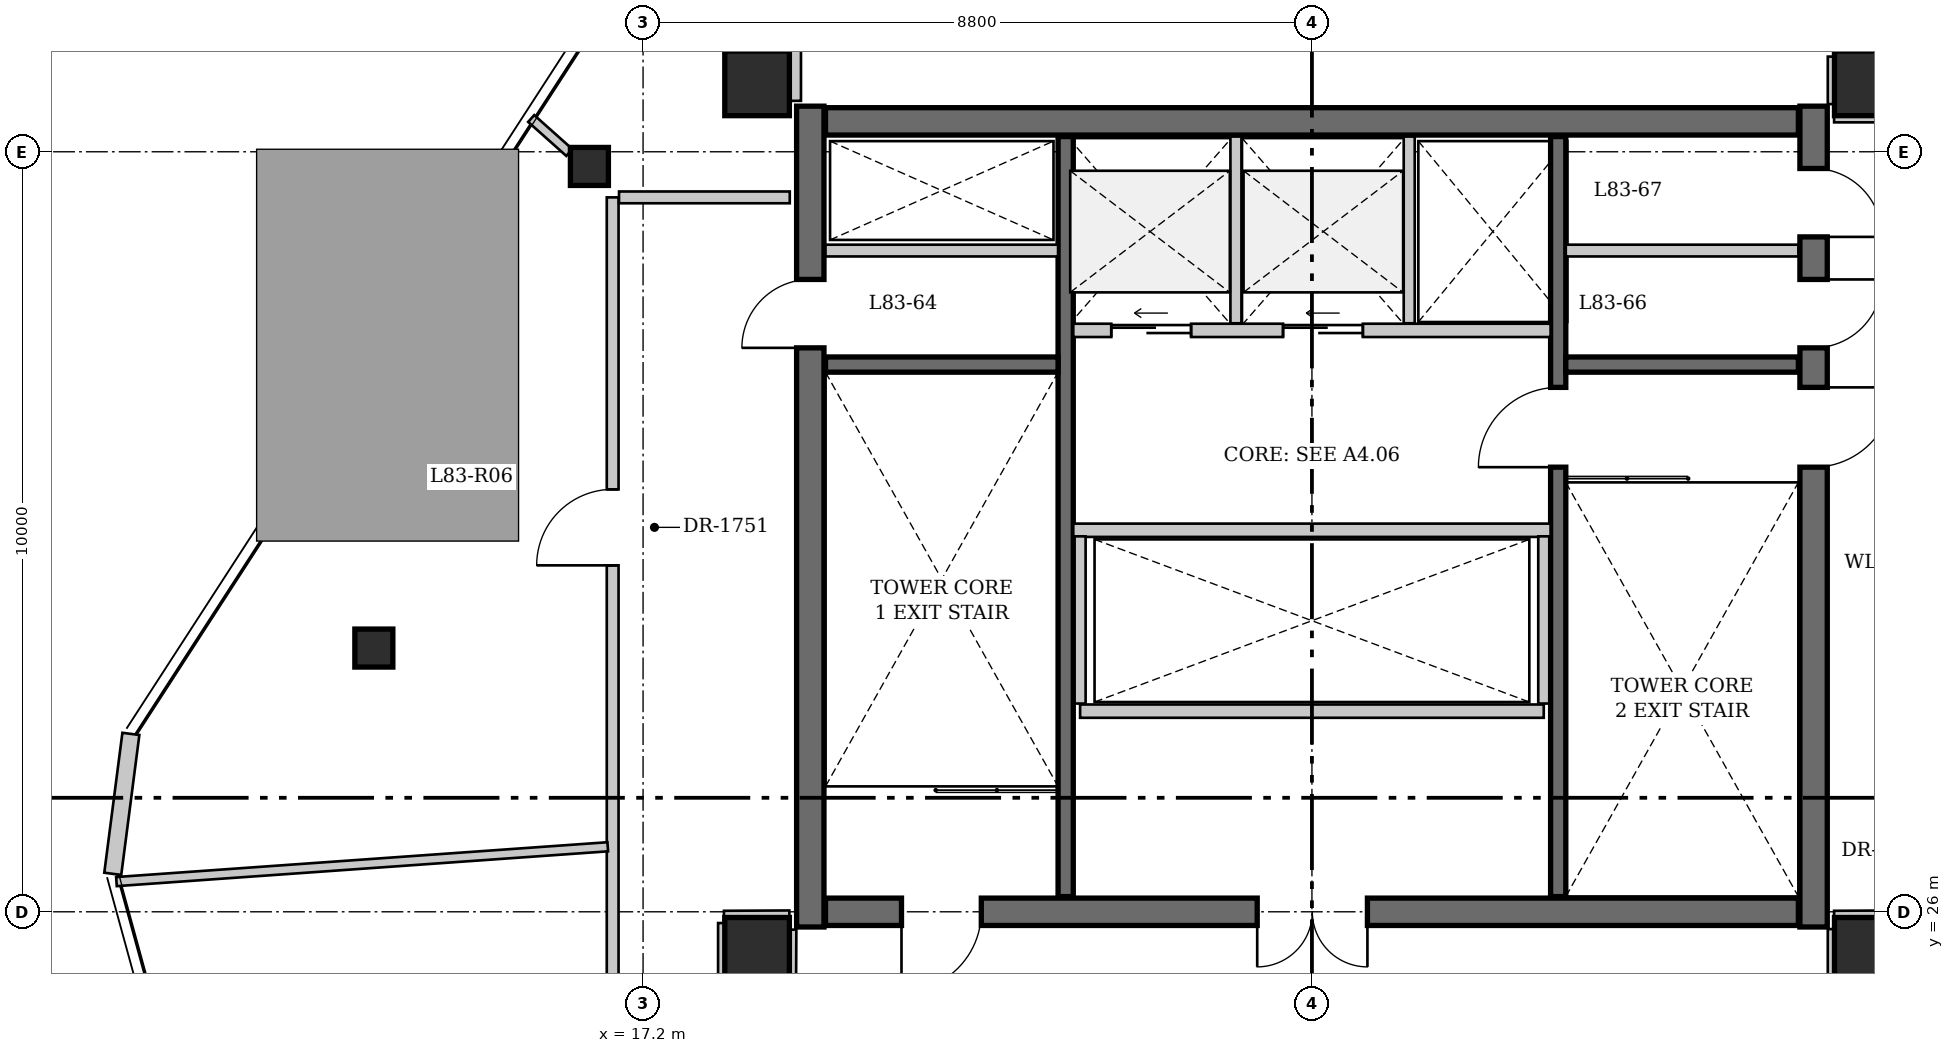
"""IFC4 building model, lengths in metres.
Left out: names, types, materials, properties, quantities, classifications, styles, units other than length and angle.
Written with IfcOpenShell. Run it as: python <this file> out.ifc"""

import sys

from ifc_helpers import new_model, si_unit, direction, frame, frame_2d, origin, origin_2d, place, context, subcontext, project, spatial, rectangle, hollow_rectangle, extrude, source, transform, mapped, element, fill, save


model = new_model("IFC4")
c1 = context("Model", 3, precision=1e-05, world=origin(), true_north=direction((0.0, 1.0)))
c2 = subcontext(c1, "Body", "Model", "MODEL_VIEW")
j1 = project(units=[si_unit("LENGTHUNIT", "METRE"), si_unit("PLANEANGLEUNIT", "RADIAN")], contexts=[c1])
p1 = place(None, origin())
s1 = spatial("IfcSite", under=j1, at=p1, CompositionType="ELEMENT")
p2 = place(p1, origin())
s2 = spatial("IfcBuilding", under=s1, at=p2, CompositionType="ELEMENT")
p3 = place(p2, frame((0.0, 0.0, 312.0)))
s3 = spatial("IfcBuildingStorey", under=s2, at=p3, CompositionType="ELEMENT", Elevation=312.0)
for number, where, z_axis, x_axis in (
    (1, (13.658, 29.47, 0.0), (0.0, 0.0, 1.0), (1.0, 0.0, 0.0)),
    (2, (16.494, 35.807, 0.0), (0.0, 0.0, 1.0), (1.0, 0.0, 0.0)),
):
    element("IfcColumn", number, at=place(p3, frame(where, z_axis=z_axis, x_axis=x_axis)), inside=s3, PredefinedType="COLUMN", context=c2, shape_type="SweptSolid", body=[
        extrude(hollow_rectangle(XDim=0.5, YDim=0.5, WallThickness=0.025, at=origin_2d()), origin(), (0.0, 0.0, 1.0), 3.725),
    ])
for number, where, z_axis, x_axis in (
    (3, (18.7, 25.5, 0.0), (0.0, 0.0, 1.0), (1.0, 0.0, 0.0)),
    (4, (33.3, 25.5, 0.0), (0.0, 0.0, 1.0), (1.0, 0.0, 0.0)),
    (5, (33.3, 36.9, 0.0), (0.0, 0.0, 1.0), (1.0, 0.0, 0.0)),
    (6, (18.7, 36.9, 0.0), (0.0, 0.0, 1.0), (1.0, 0.0, 0.0)),
):
    element("IfcColumn", number, at=place(p3, frame(where, z_axis=z_axis, x_axis=x_axis)), inside=s3, PredefinedType="COLUMN", context=c2, shape_type="SweptSolid", body=[
        extrude(rectangle(XDim=0.85, YDim=0.85, at=origin_2d()), origin(), (0.0, 0.0, 1.0), 3.725),
    ])
p4 = place(p3, frame((10.223, 26.5, 0.0), z_axis=(0.0, 0.0, 1.0), x_axis=(0.128338490171, 0.991730423019, 0.0)))
e7 = element("IfcWall", 7, at=p4, inside=s3, PredefinedType="SOLIDWALL", context=c2, shape_type="SweptSolid", body=[
    extrude(rectangle(XDim=1.857, YDim=0.225, at=frame_2d((0.928, 0.0))), origin(), (0.0, 0.0, 1.0), 3.74),
])
p5 = place(p3, frame((19.4, 25.8, 0.0), z_axis=(0.0, 0.0, 1.0), x_axis=(0.0, 1.0, 0.0)))
e8 = element("IfcWall", 8, at=p5, inside=s3, PredefinedType="SHEAR", context=c2, shape_type="SweptSolid", body=[
    extrude(rectangle(XDim=10.8, YDim=0.36, at=frame_2d((5.4, 0.0))), origin(), (0.0, 0.0, 1.0), 4.0),
])
p6 = place(p5, frame((7.62, 0.0, 0.0)))
e9 = element("IfcOpeningElement", 9, at=p6, cuts=e8, PredefinedType="OPENING", context=c2, shape_type="SweptSolid", body=[
    extrude(rectangle(XDim=0.9, YDim=2.1, at=frame_2d((0.45, 1.05))), frame((0.0, 0.19, 0.0), z_axis=(0.0, -1.0, 0.0), x_axis=(1.0, 0.0, 0.0)), (0.0, 0.0, 1.0), 0.38),
])
p7 = place(p3, frame((32.6, 36.6, 0.0), z_axis=(0.0, 0.0, 1.0), x_axis=(0.0, -1.0, 0.0)))
e10 = element("IfcWall", 10, at=p7, inside=s3, PredefinedType="SHEAR", context=c2, shape_type="SweptSolid", body=[
    extrude(rectangle(XDim=10.8, YDim=0.36, at=frame_2d((5.4, 0.0))), origin(), (0.0, 0.0, 1.0), 4.0),
])
p8 = place(p7, frame((3.7, 0.0, 0.0)))
e11 = element("IfcOpeningElement", 11, at=p8, cuts=e10, PredefinedType="OPENING", context=c2, shape_type="SweptSolid", body=[
    extrude(rectangle(XDim=1.05, YDim=2.15, at=frame_2d((0.525, 1.075))), frame((0.0, 0.19, 0.0), z_axis=(0.0, -1.0, 0.0), x_axis=(1.0, 0.0, 0.0)), (0.0, 0.0, 1.0), 0.38),
])
p9 = place(p7, frame((2.28, 0.0, 0.0)))
e12 = element("IfcOpeningElement", 12, at=p9, cuts=e10, PredefinedType="OPENING", context=c2, shape_type="SweptSolid", body=[
    extrude(rectangle(XDim=0.9, YDim=2.1, at=frame_2d((0.45, 1.05))), frame((0.0, 0.19, 0.0), z_axis=(0.0, -1.0, 0.0), x_axis=(1.0, 0.0, 0.0)), (0.0, 0.0, 1.0), 0.38),
])
p10 = place(p7, frame((0.82, 0.0, 0.0)))
e13 = element("IfcOpeningElement", 13, at=p10, cuts=e10, PredefinedType="OPENING", context=c2, shape_type="SweptSolid", body=[
    extrude(rectangle(XDim=0.9, YDim=2.1, at=frame_2d((0.45, 1.05))), frame((0.0, 0.19, 0.0), z_axis=(0.0, -1.0, 0.0), x_axis=(1.0, 0.0, 0.0)), (0.0, 0.0, 1.0), 0.38),
])
p11 = place(p3, frame((19.6, 36.4, 0.0), z_axis=(0.0, 0.0, 1.0), x_axis=(1.0, 0.0, 0.0)))
e14 = element("IfcWall", 14, at=p11, inside=s3, PredefinedType="SHEAR", context=c2, shape_type="SweptSolid", body=[
    extrude(rectangle(XDim=12.8, YDim=0.36, at=frame_2d((6.4, 0.0))), origin(), (0.0, 0.0, 1.0), 4.0),
])
p12 = place(p3, frame((32.4, 26.0, 0.0), z_axis=(0.0, 0.0, 1.0), x_axis=(-1.0, 0.0, 0.0)))
e15 = element("IfcWall", 15, at=p12, inside=s3, PredefinedType="SHEAR", context=c2, shape_type="SweptSolid", body=[
    extrude(rectangle(XDim=12.8, YDim=0.36, at=frame_2d((6.4, 0.0))), origin(), (0.0, 0.0, 1.0), 4.0),
])
p13 = place(p12, frame((10.75, 0.0, 0.0)))
e16 = element("IfcOpeningElement", 16, at=p13, cuts=e15, PredefinedType="OPENING", context=c2, shape_type="SweptSolid", body=[
    extrude(rectangle(XDim=1.05, YDim=2.15, at=frame_2d((0.525, 1.075))), frame((0.0, 0.19, 0.0), z_axis=(0.0, -1.0, 0.0), x_axis=(1.0, 0.0, 0.0)), (0.0, 0.0, 1.0), 0.38),
])
p14 = place(p12, frame((5.67, 0.0, 0.0)))
e17 = element("IfcOpeningElement", 17, at=p14, cuts=e15, PredefinedType="OPENING", context=c2, shape_type="SweptSolid", body=[
    extrude(rectangle(XDim=1.45, YDim=2.2, at=frame_2d((0.725, 1.1))), frame((0.0, 0.19, 0.0), z_axis=(0.0, -1.0, 0.0), x_axis=(1.0, 0.0, 0.0)), (0.0, 0.0, 1.0), 0.38),
])
p15 = place(p3, frame((22.76, 26.2, 0.0), z_axis=(0.0, 0.0, 1.0), x_axis=(0.0, 1.0, 0.0)))
e18 = element("IfcWall", 18, at=p15, inside=s3, PredefinedType="SHEAR", context=c2, shape_type="SweptSolid", body=[
    extrude(rectangle(XDim=10.0, YDim=0.2, at=frame_2d((5.0, 0.0))), origin(), (0.0, 0.0, 1.0), 4.0),
])
p16 = place(p3, frame((29.24, 26.2, 0.0), z_axis=(0.0, 0.0, 1.0), x_axis=(0.0, 1.0, 0.0)))
e19 = element("IfcWall", 19, at=p16, inside=s3, PredefinedType="SHEAR", context=c2, shape_type="SweptSolid", body=[
    extrude(rectangle(XDim=10.0, YDim=0.2, at=frame_2d((5.0, 0.0))), origin(), (0.0, 0.0, 1.0), 4.0),
])
p17 = place(p16, frame((5.65, 0.0, 0.0)))
e20 = element("IfcOpeningElement", 20, at=p17, cuts=e19, PredefinedType="OPENING", context=c2, shape_type="SweptSolid", body=[
    extrude(rectangle(XDim=1.05, YDim=2.15, at=frame_2d((0.525, 1.075))), frame((0.0, 0.11, 0.0), z_axis=(0.0, -1.0, 0.0), x_axis=(1.0, 0.0, 0.0)), (0.0, 0.0, 1.0), 0.22),
])
for number, where, z_axis, x_axis in (
    (21, (19.6, 33.2, 0.0), (0.0, 0.0, 1.0), (1.0, 0.0, 0.0)),
    (22, (29.34, 33.2, 0.0), (0.0, 0.0, 1.0), (1.0, 0.0, 0.0)),
):
    element("IfcWall", number, at=place(p3, frame(where, z_axis=z_axis, x_axis=x_axis)), inside=s3, PredefinedType="SHEAR", context=c2, shape_type="SweptSolid", body=[
        extrude(rectangle(XDim=3.06, YDim=0.2, at=frame_2d((1.53, 0.0))), origin(), (0.0, 0.0, 1.0), 4.0),
    ])
p18 = place(p3, frame((22.86, 33.65, 0.0), z_axis=(0.0, 0.0, 1.0), x_axis=(1.0, 0.0, 0.0)))
e23 = element("IfcWall", 23, at=p18, inside=s3, PredefinedType="SOLIDWALL", context=c2, shape_type="SweptSolid", body=[
    extrude(rectangle(XDim=6.28, YDim=0.175, at=frame_2d((3.14, 0.0))), origin(), (0.0, 0.0, 1.0), 3.725),
])
p19 = place(p18, frame((0.5, 0.0, 0.0)))
e24 = element("IfcOpeningElement", 24, at=p19, cuts=e23, PredefinedType="OPENING", context=c2, shape_type="SweptSolid", body=[
    extrude(rectangle(XDim=1.05, YDim=2.15, at=frame_2d((0.525, 1.075))), frame((0.0, 0.098, 0.0), z_axis=(0.0, -1.0, 0.0), x_axis=(1.0, 0.0, 0.0)), (0.0, 0.0, 1.0), 0.195),
])
p20 = place(p18, frame((2.76, 0.0, 0.0)))
e25 = element("IfcOpeningElement", 25, at=p20, cuts=e23, PredefinedType="OPENING", context=c2, shape_type="SweptSolid", body=[
    extrude(rectangle(XDim=1.05, YDim=2.15, at=frame_2d((0.525, 1.075))), frame((0.0, 0.098, 0.0), z_axis=(0.0, -1.0, 0.0), x_axis=(1.0, 0.0, 0.0)), (0.0, 0.0, 1.0), 0.195),
])
for number, where, z_axis, x_axis in (
    (26, (25.0, 33.743, 0.0), (0.0, 0.0, 1.0), (0.0, 1.0, 0.0)),
    (27, (27.28, 33.743, 0.0), (0.0, 0.0, 1.0), (0.0, 1.0, 0.0)),
):
    element("IfcWall", number, at=place(p3, frame(where, z_axis=z_axis, x_axis=x_axis)), inside=s3, PredefinedType="SOLIDWALL", context=c2, shape_type="SweptSolid", body=[
        extrude(rectangle(XDim=2.457, YDim=0.145, at=frame_2d((1.228, 0.0))), origin(), (0.0, 0.0, 1.0), 3.725),
    ])
p21 = place(p3, frame((22.86, 31.02, 0.0), z_axis=(0.0, 0.0, 1.0), x_axis=(1.0, 0.0, 0.0)))
e28 = element("IfcWall", 28, at=p21, inside=s3, PredefinedType="SOLIDWALL", context=c2, shape_type="SweptSolid", body=[
    extrude(rectangle(XDim=6.28, YDim=0.175, at=frame_2d((3.14, 0.0))), origin(), (0.0, 0.0, 1.0), 3.725),
])
p22 = place(p3, frame((22.95, 28.64, 0.0), z_axis=(0.0, 0.0, 1.0), x_axis=(1.0, 0.0, 0.0)))
e29 = element("IfcWall", 29, at=p22, inside=s3, PredefinedType="SOLIDWALL", context=c2, shape_type="SweptSolid", body=[
    extrude(rectangle(XDim=6.1, YDim=0.175, at=frame_2d((3.05, 0.0))), origin(), (0.0, 0.0, 1.0), 3.725),
])
for number, where, z_axis, x_axis in (
    (30, (22.95, 28.74, 0.0), (0.0, 0.0, 1.0), (0.0, 1.0, 0.0)),
    (31, (29.05, 28.74, 0.0), (0.0, 0.0, 1.0), (0.0, 1.0, 0.0)),
):
    element("IfcWall", number, at=place(p3, frame(where, z_axis=z_axis, x_axis=x_axis)), inside=s3, PredefinedType="SOLIDWALL", context=c2, shape_type="SweptSolid", body=[
        extrude(rectangle(XDim=2.2, YDim=0.145, at=frame_2d((1.1, 0.0))), origin(), (0.0, 0.0, 1.0), 3.725),
    ])
for number, where, z_axis, x_axis in (
    (32, (19.6, 34.7, 0.0), (0.0, 0.0, 1.0), (1.0, 0.0, 0.0)),
    (33, (29.34, 34.7, 0.0), (0.0, 0.0, 1.0), (1.0, 0.0, 0.0)),
):
    element("IfcWall", number, at=place(p3, frame(where, z_axis=z_axis, x_axis=x_axis)), inside=s3, PredefinedType="PARTITIONING", context=c2, shape_type="SweptSolid", body=[
        extrude(rectangle(XDim=3.06, YDim=0.155, at=frame_2d((1.53, 0.0))), origin(), (0.0, 0.0, 1.0), 3.725),
    ])
p23 = place(p3, frame((16.8, 23.083, 0.0), z_axis=(0.0, 0.0, 1.0), x_axis=(0.0, 1.0, 0.0)))
e34 = element("IfcWall", 34, at=p23, inside=s3, PredefinedType="PARTITIONING", context=c2, shape_type="SweptSolid", body=[
    extrude(rectangle(XDim=12.316, YDim=0.155, at=frame_2d((6.158, 0.0))), origin(), (0.0, 0.0, 1.0), 3.725),
])
p24 = place(p23, frame((7.475, 0.0, 0.0)))
e35 = element("IfcOpeningElement", 35, at=p24, cuts=e34, PredefinedType="OPENING", context=c2, shape_type="SweptSolid", body=[
    extrude(rectangle(XDim=1.0, YDim=2.15, at=frame_2d((0.5, 1.075))), frame((0.0, 0.087, 0.0), z_axis=(0.0, -1.0, 0.0), x_axis=(1.0, 0.0, 0.0)), (0.0, 0.0, 1.0), 0.175),
])
p25 = place(p3, frame((16.884, 35.4, 0.0), z_axis=(0.0, 0.0, 1.0), x_axis=(1.0, 0.0, 0.0)))
e36 = element("IfcWall", 36, at=p25, inside=s3, PredefinedType="PARTITIONING", context=c2, shape_type="SweptSolid", body=[
    extrude(rectangle(XDim=2.246, YDim=0.155, at=frame_2d((1.123, 0.0))), origin(), (0.0, 0.0, 1.0), 3.725),
])
p26 = place(p3, frame((19.2, 36.67, 0.0), z_axis=(0.0, 0.0, 1.0), x_axis=(0.0, 1.0, 0.0)))
e37 = element("IfcWall", 37, at=p26, inside=s3, PredefinedType="PARTITIONING", context=c2, shape_type="SweptSolid", body=[
    extrude(rectangle(XDim=3.1, YDim=0.155, at=frame_2d((1.55, 0.0))), origin(), (0.0, 0.0, 1.0), 3.725),
])
p27 = place(p3, frame((33.725, 25.94, 0.0), z_axis=(0.0, 0.0, 1.0), x_axis=(-0.999986790873, -0.005139852152, 0.0)))
e38 = element("IfcWall", 38, at=p27, inside=s3, PredefinedType="PARTITIONING", context=c2, shape_type="SweptSolid", body=[
    extrude(rectangle(XDim=0.855, YDim=0.155, at=frame_2d((0.427, 0.0))), origin(), (0.0, 0.0, 1.0), 3.725),
])
p28 = place(p3, frame((32.865, 25.773, 0.0), z_axis=(0.0, 0.0, 1.0), x_axis=(0.0, -1.0, 0.0)))
e39 = element("IfcWall", 39, at=p28, inside=s3, PredefinedType="PARTITIONING", context=c2, shape_type="SweptSolid", body=[
    extrude(rectangle(XDim=0.708, YDim=0.155, at=frame_2d((0.354, 0.0))), origin(), (0.0, 0.0, 1.0), 3.725),
])
p29 = place(p3, frame((33.725, 37.34, 0.0), z_axis=(0.0, 0.0, 1.0), x_axis=(-0.999986962681, -0.005106316405, 0.0)))
e40 = element("IfcWall", 40, at=p29, inside=s3, PredefinedType="PARTITIONING", context=c2, shape_type="SweptSolid", body=[
    extrude(rectangle(XDim=0.861, YDim=0.155, at=frame_2d((0.43, 0.0))), origin(), (0.0, 0.0, 1.0), 3.725),
])
p30 = place(p3, frame((32.865, 37.252, 0.0), z_axis=(0.0, 0.0, 1.0), x_axis=(0.0, -1.0, 0.0)))
e41 = element("IfcWall", 41, at=p30, inside=s3, PredefinedType="PARTITIONING", context=c2, shape_type="SweptSolid", body=[
    extrude(rectangle(XDim=0.625, YDim=0.155, at=frame_2d((0.312, 0.0))), origin(), (0.0, 0.0, 1.0), 3.725),
])
p31 = place(p3, frame((32.87, 36.464, 0.0), z_axis=(0.0, 0.0, 1.0), x_axis=(1.0, 0.0, 0.0)))
e42 = element("IfcWall", 42, at=p31, inside=s3, PredefinedType="PARTITIONING", context=c2, shape_type="SweptSolid", body=[
    extrude(rectangle(XDim=0.865, YDim=0.155, at=frame_2d((0.433, 0.0))), origin(), (0.0, 0.0, 1.0), 3.725),
])
p32 = place(p3, frame((19.125, 25.94, 0.0), z_axis=(0.0, 0.0, 1.0), x_axis=(-0.999986962681, -0.005106316405, 0.0)))
e43 = element("IfcWall", 43, at=p32, inside=s3, PredefinedType="PARTITIONING", context=c2, shape_type="SweptSolid", body=[
    extrude(rectangle(XDim=0.861, YDim=0.155, at=frame_2d((0.43, 0.0))), origin(), (0.0, 0.0, 1.0), 3.725),
])
p33 = place(p3, frame((18.264, 25.852, 0.0), z_axis=(0.0, 0.0, 1.0), x_axis=(0.0, -1.0, 0.0)))
e44 = element("IfcWall", 44, at=p33, inside=s3, PredefinedType="PARTITIONING", context=c2, shape_type="SweptSolid", body=[
    extrude(rectangle(XDim=0.788, YDim=0.155, at=frame_2d((0.394, 0.0))), origin(), (0.0, 0.0, 1.0), 3.725),
])
p34 = place(p3, frame((19.136, 25.148, 0.0), z_axis=(0.0, 0.0, 1.0), x_axis=(0.005140303777, 0.999986788551, 0.0)))
e45 = element("IfcWall", 45, at=p34, inside=s3, PredefinedType="PARTITIONING", context=c2, shape_type="SweptSolid", body=[
    extrude(rectangle(XDim=0.617, YDim=0.155, at=frame_2d((0.309, 0.0))), origin(), (0.0, 0.0, 1.0), 3.725),
])
p35 = place(p3, frame((10.271, 26.397, 0.0), z_axis=(0.0, 0.0, 1.0), x_axis=(0.997498894398, 0.070682074632, 0.0)))
e46 = element("IfcWall", 46, at=p35, inside=s3, PredefinedType="PARTITIONING", context=c2, shape_type="SweptSolid", body=[
    extrude(rectangle(XDim=6.48, YDim=0.12, at=frame_2d((3.24, 0.0))), origin(), (0.0, 0.0, 1.0), 3.725),
])
p36 = place(p3, frame((16.23, 35.99, 0.0), z_axis=(0.0, 0.0, 1.0), x_axis=(-0.746266181096, 0.665647644744, 0.0)))
e47 = element("IfcWall", 47, at=p36, inside=s3, PredefinedType="PARTITIONING", context=c2, shape_type="SweptSolid", body=[
    extrude(rectangle(XDim=0.672, YDim=0.12, at=frame_2d((0.336, 0.0))), origin(), (0.0, 0.0, 1.0), 3.725),
])
m1 = source(origin(), c2, "Body", "SweptSolid", [
    extrude(rectangle(XDim=1.05, YDim=2.15, at=frame_2d((0.525, 1.075))), frame((0.0, 0.025, 0.0), z_axis=(0.0, -1.0, 0.0), x_axis=(1.0, 0.0, 0.0)), (0.0, 0.0, 1.0), 0.05),
])
p37 = place(p13, origin())
e48 = element("IfcDoor", 48, at=p37, inside=s3, OperationType="SINGLE_SWING_RIGHT", PredefinedType="DOOR", context=c2, shape_type="MappedRepresentation", body=[
    mapped(m1, transform((0.0, 0.0, 0.0), x_axis=(1.0, 0.0, 0.0), y_axis=(0.0, 1.0, 0.0), z_axis=(0.0, 0.0, 1.0), scale=1.0)),
])
fill(e16, e48)
m2 = source(origin(), c2, "Body", "SweptSolid", [
    extrude(rectangle(XDim=1.45, YDim=2.2, at=frame_2d((0.725, 1.1))), frame((0.0, 0.025, 0.0), z_axis=(0.0, -1.0, 0.0), x_axis=(1.0, 0.0, 0.0)), (0.0, 0.0, 1.0), 0.05),
])
p38 = place(p14, origin())
e49 = element("IfcDoor", 49, at=p38, inside=s3, OperationType="DOUBLE_DOOR_SINGLE_SWING", PredefinedType="DOOR", context=c2, shape_type="MappedRepresentation", body=[
    mapped(m2, transform((0.0, 0.0, 0.0), x_axis=(1.0, 0.0, 0.0), y_axis=(0.0, 1.0, 0.0), z_axis=(0.0, 0.0, 1.0), scale=1.0)),
])
fill(e17, e49)
p39 = place(p8, origin())
e50 = element("IfcDoor", 50, at=p39, inside=s3, OperationType="SINGLE_SWING_LEFT", PredefinedType="DOOR", context=c2, shape_type="MappedRepresentation", body=[
    mapped(m1, transform((0.0, 0.0, 0.0), x_axis=(1.0, 0.0, 0.0), y_axis=(0.0, 1.0, 0.0), z_axis=(0.0, 0.0, 1.0), scale=1.0)),
])
fill(e11, e50)
p40 = place(p17, origin())
e51 = element("IfcDoor", 51, at=p40, inside=s3, OperationType="SINGLE_SWING_LEFT", PredefinedType="DOOR", context=c2, shape_type="MappedRepresentation", body=[
    mapped(m1, transform((0.0, 0.0, 0.0), x_axis=(1.0, 0.0, 0.0), y_axis=(0.0, 1.0, 0.0), z_axis=(0.0, 0.0, 1.0), scale=1.0)),
])
fill(e20, e51)
m3 = source(origin(), c2, "Body", "SweptSolid", [
    extrude(rectangle(XDim=1.05, YDim=2.15, at=frame_2d((0.525, 1.075))), frame((0.0, 0.025, 0.0), z_axis=(0.0, -1.0, 0.0), x_axis=(1.0, 0.0, 0.0)), (0.0, 0.0, 1.0), 0.05),
])
p41 = place(p19, origin())
e52 = element("IfcDoor", 52, at=p41, inside=s3, OperationType="SLIDING_TO_LEFT", PredefinedType="DOOR", context=c2, shape_type="MappedRepresentation", body=[
    mapped(m3, transform((0.0, 0.0, 0.0), x_axis=(1.0, 0.0, 0.0), y_axis=(0.0, 1.0, 0.0), z_axis=(0.0, 0.0, 1.0), scale=1.0)),
])
fill(e24, e52)
p42 = place(p20, origin())
e53 = element("IfcDoor", 53, at=p42, inside=s3, OperationType="SLIDING_TO_LEFT", PredefinedType="DOOR", context=c2, shape_type="MappedRepresentation", body=[
    mapped(m3, transform((0.0, 0.0, 0.0), x_axis=(1.0, 0.0, 0.0), y_axis=(0.0, 1.0, 0.0), z_axis=(0.0, 0.0, 1.0), scale=1.0)),
])
fill(e25, e53)
m4 = source(origin(), c2, "Body", "SweptSolid", [
    extrude(rectangle(XDim=0.9, YDim=2.1, at=frame_2d((0.45, 1.05))), frame((0.0, 0.025, 0.0), z_axis=(0.0, -1.0, 0.0), x_axis=(1.0, 0.0, 0.0)), (0.0, 0.0, 1.0), 0.05),
])
p43 = place(p6, origin())
e54 = element("IfcDoor", 54, at=p43, inside=s3, OperationType="SINGLE_SWING_LEFT", PredefinedType="DOOR", context=c2, shape_type="MappedRepresentation", body=[
    mapped(m4, transform((0.0, 0.0, 0.0), x_axis=(1.0, 0.0, 0.0), y_axis=(0.0, 1.0, 0.0), z_axis=(0.0, 0.0, 1.0), scale=1.0)),
])
fill(e9, e54)
p44 = place(p9, origin())
e55 = element("IfcDoor", 55, at=p44, inside=s3, OperationType="SINGLE_SWING_LEFT", PredefinedType="DOOR", context=c2, shape_type="MappedRepresentation", body=[
    mapped(m4, transform((0.0, 0.0, 0.0), x_axis=(1.0, 0.0, 0.0), y_axis=(0.0, 1.0, 0.0), z_axis=(0.0, 0.0, 1.0), scale=1.0)),
])
fill(e12, e55)
p45 = place(p10, origin())
e56 = element("IfcDoor", 56, at=p45, inside=s3, OperationType="SINGLE_SWING_RIGHT", PredefinedType="DOOR", context=c2, shape_type="MappedRepresentation", body=[
    mapped(m4, transform((0.0, 0.0, 0.0), x_axis=(1.0, 0.0, 0.0), y_axis=(0.0, 1.0, 0.0), z_axis=(0.0, 0.0, 1.0), scale=1.0)),
])
fill(e13, e56)
m5 = source(origin(), c2, "Body", "SweptSolid", [
    extrude(rectangle(XDim=1.0, YDim=2.15, at=frame_2d((0.5, 1.075))), frame((0.0, 0.025, 0.0), z_axis=(0.0, -1.0, 0.0), x_axis=(1.0, 0.0, 0.0)), (0.0, 0.0, 1.0), 0.05),
])
p46 = place(p24, origin())
e57 = element("IfcDoor", 57, at=p46, inside=s3, OperationType="SINGLE_SWING_LEFT", PredefinedType="DOOR", context=c2, shape_type="MappedRepresentation", body=[
    mapped(m5, transform((0.0, 0.0, 0.0), x_axis=(1.0, 0.0, 0.0), y_axis=(0.0, 1.0, 0.0), z_axis=(0.0, 0.0, 1.0), scale=1.0)),
])
fill(e35, e57)
save(model, sys.argv[1])
